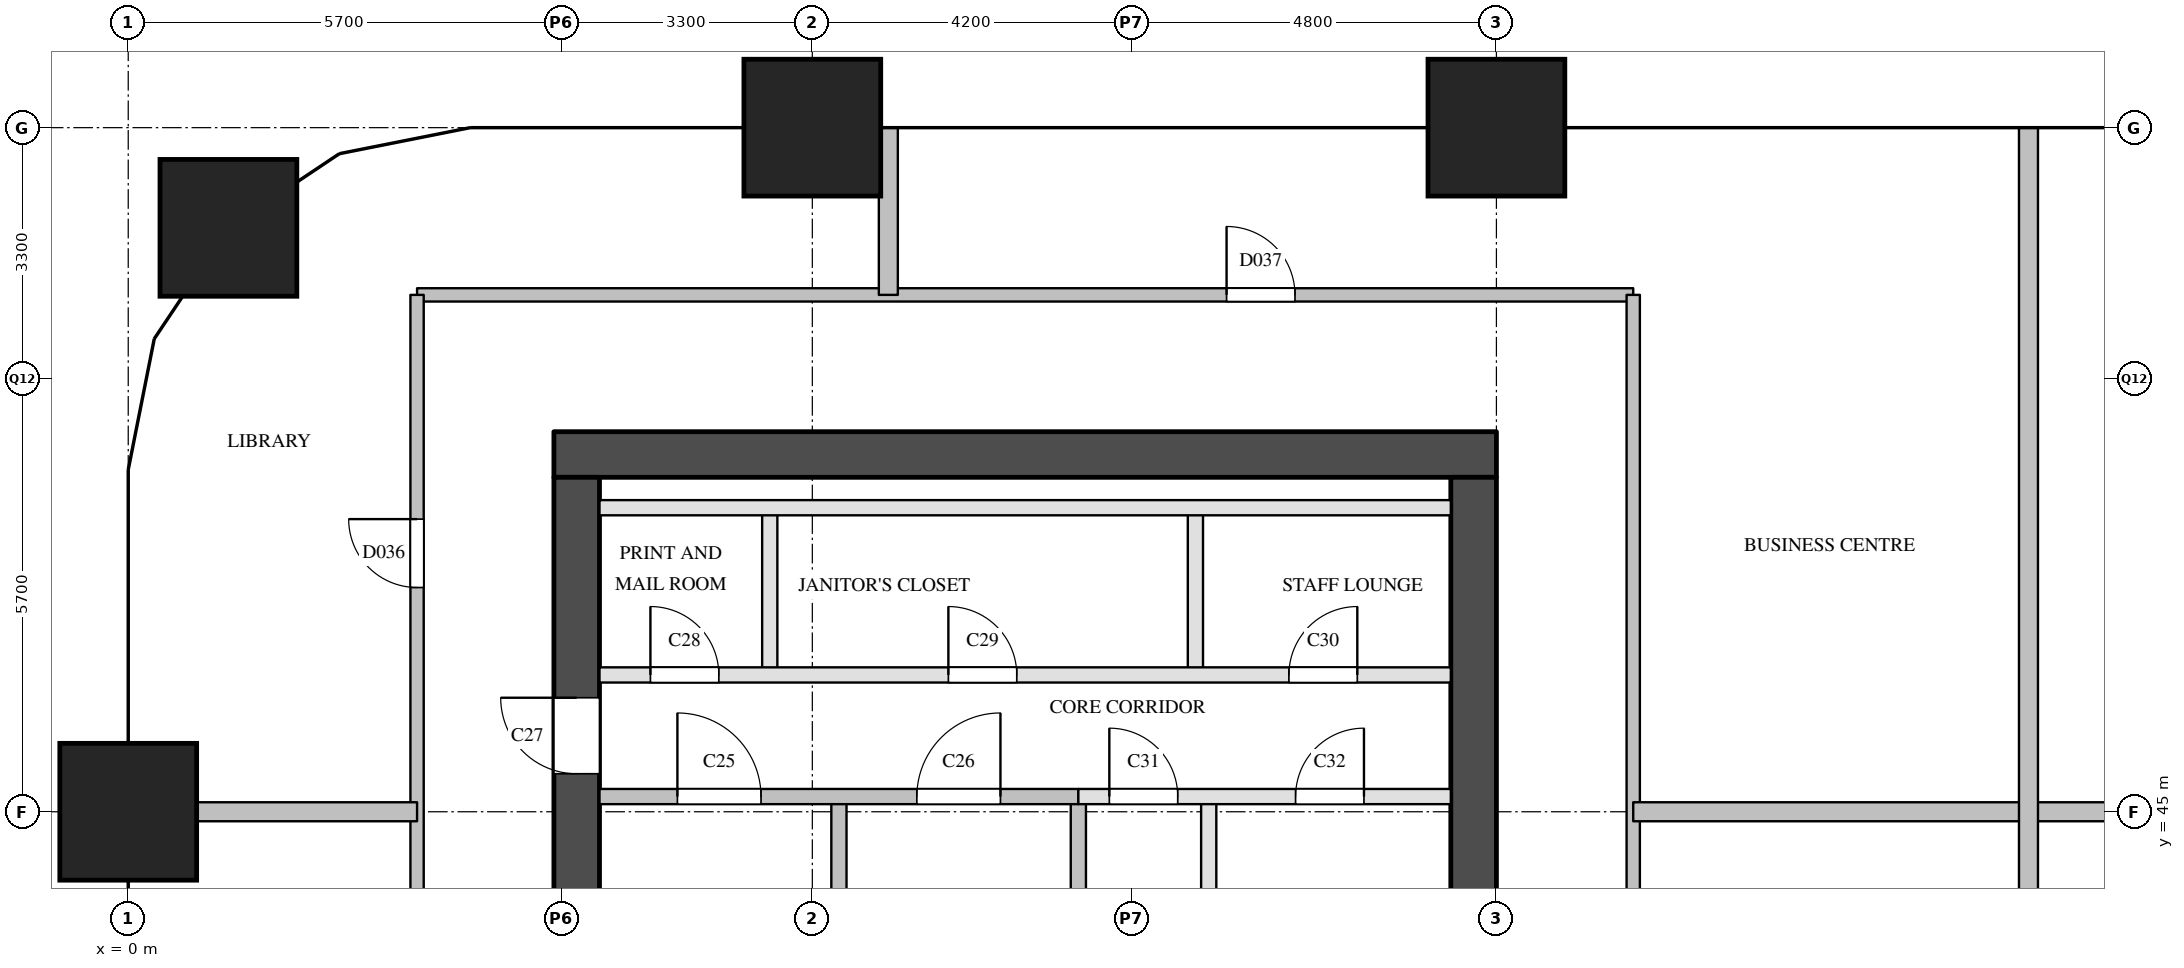
"""IFC4 building model, lengths in metres.
Left out: names, types, materials, properties, quantities, classifications, styles, units other than length and angle.
Written with IfcOpenShell. Run it as: python <this file> out.ifc"""

import sys

from ifc_helpers import new_model, si_unit, direction, frame, frame_2d, origin, origin_2d, place, context, subcontext, project, spatial, rectangle, extrude, element, fill, save


model = new_model("IFC4")
c1 = context("Model", 3, precision=1e-05, world=origin(), true_north=direction((0.0, 1.0)))
c2 = subcontext(c1, "Body", "Model", "MODEL_VIEW")
j1 = project(units=[si_unit("LENGTHUNIT", "METRE"), si_unit("PLANEANGLEUNIT", "RADIAN")], contexts=[c1])
p1 = place(None, origin())
s1 = spatial("IfcSite", under=j1, at=p1, CompositionType="ELEMENT")
p2 = place(p1, origin())
s2 = spatial("IfcBuilding", under=s1, at=p2, CompositionType="ELEMENT")
p3 = place(p2, frame((0.0, 0.0, 42.4)))
s3 = spatial("IfcBuildingStorey", under=s2, at=p3, CompositionType="ELEMENT", Elevation=42.4)
for number, where, z_axis, x_axis in (
    (1, (0.0, 45.0, 0.0), (0.0, 0.0, 1.0), (1.0, 0.0, 0.0)),
    (2, (1.318, 52.682, 0.0), (0.0, 0.0, 1.0), (1.0, 0.0, 0.0)),
    (3, (9.0, 54.0, 0.0), (0.0, 0.0, 1.0), (1.0, 0.0, 0.0)),
    (4, (18.0, 54.0, 0.0), (0.0, 0.0, 1.0), (1.0, 0.0, 0.0)),
):
    element("IfcColumn", number, at=place(p3, frame(where, z_axis=z_axis, x_axis=x_axis)), inside=s3, PredefinedType="COLUMN", context=c2, shape_type="SweptSolid", body=[
        extrude(rectangle(XDim=1.8, YDim=1.8, at=origin_2d()), origin(), (0.0, 0.0, 1.0), 3.8),
    ])
p4 = place(p3, frame((5.6, 49.7, 0.0), z_axis=(0.0, 0.0, 1.0), x_axis=(1.0, 0.0, 0.0)))
e5 = element("IfcWall", 5, at=p4, inside=s3, PredefinedType="SHEAR", context=c2, shape_type="SweptSolid", body=[
    extrude(rectangle(XDim=12.4, YDim=0.6, at=frame_2d((6.2, 0.0))), origin(), (0.0, 0.0, 1.0), 3.5),
])
p5 = place(p3, frame((5.9, 29.1, 0.0), z_axis=(0.0, 0.0, 1.0), x_axis=(0.0, 1.0, 0.0)))
e6 = element("IfcWall", 6, at=p5, inside=s3, PredefinedType="SHEAR", context=c2, shape_type="SweptSolid", body=[
    extrude(rectangle(XDim=20.3, YDim=0.6, at=frame_2d((10.15, 0.0))), origin(), (0.0, 0.0, 1.0), 3.5),
])
p6 = place(p5, frame((3.6, 0.0, 0.0)))
e7 = element("IfcOpeningElement", 7, at=p6, cuts=e6, PredefinedType="OPENING", context=c2, shape_type="SweptSolid", body=[
    extrude(rectangle(XDim=1.8, YDim=2.1, at=frame_2d((0.9, 1.05))), frame((0.0, 0.31, 0.0), z_axis=(0.0, -1.0, 0.0), x_axis=(1.0, 0.0, 0.0)), (0.0, 0.0, 1.0), 0.62),
])
p7 = place(p5, frame((16.4, 0.0, 0.0)))
e8 = element("IfcOpeningElement", 8, at=p7, cuts=e6, PredefinedType="OPENING", context=c2, shape_type="SweptSolid", body=[
    extrude(rectangle(XDim=1.0, YDim=2.1, at=frame_2d((0.5, 1.05))), frame((0.0, 0.31, 0.0), z_axis=(0.0, -1.0, 0.0), x_axis=(1.0, 0.0, 0.0)), (0.0, 0.0, 1.0), 0.62),
])
p8 = place(p3, frame((17.7, 29.1, 0.0), z_axis=(0.0, 0.0, 1.0), x_axis=(0.0, 1.0, 0.0)))
e9 = element("IfcWall", 9, at=p8, inside=s3, PredefinedType="SHEAR", context=c2, shape_type="SweptSolid", body=[
    extrude(rectangle(XDim=20.3, YDim=0.6, at=frame_2d((10.15, 0.0))), origin(), (0.0, 0.0, 1.0), 3.5),
])
p9 = place(p8, frame((1.25, 0.0, 0.0)))
e10 = element("IfcOpeningElement", 10, at=p9, cuts=e9, PredefinedType="OPENING", context=c2, shape_type="SweptSolid", body=[
    extrude(rectangle(XDim=0.7, YDim=2.1, at=frame_2d((0.35, 1.05))), frame((0.0, 0.31, 0.0), z_axis=(0.0, -1.0, 0.0), x_axis=(1.0, 0.0, 0.0)), (0.0, 0.0, 1.0), 0.62),
])
p10 = place(p8, frame((7.05, 0.0, 0.0)))
e11 = element("IfcOpeningElement", 11, at=p10, cuts=e9, PredefinedType="OPENING", context=c2, shape_type="SweptSolid", body=[
    extrude(rectangle(XDim=0.7, YDim=2.1, at=frame_2d((0.35, 1.05))), frame((0.0, 0.31, 0.0), z_axis=(0.0, -1.0, 0.0), x_axis=(1.0, 0.0, 0.0)), (0.0, 0.0, 1.0), 0.62),
])
p11 = place(p3, frame((8.44, 46.8, 0.0), z_axis=(0.0, 0.0, 1.0), x_axis=(0.0, 1.0, 0.0)))
e12 = element("IfcWall", 12, at=p11, inside=s3, PredefinedType="PARTITIONING", context=c2, shape_type="SweptSolid", body=[
    extrude(rectangle(XDim=2.2, YDim=0.2, at=frame_2d((1.1, 0.0))), origin(), (0.0, 0.0, 1.0), 3.5),
])
for number, where, z_axis, x_axis in (
    (13, (9.35, 40.9, 0.0), (0.0, 0.0, 1.0), (0.0, 1.0, 0.0)),
    (14, (12.5, 40.9, 0.0), (0.0, 0.0, 1.0), (0.0, 1.0, 0.0)),
):
    element("IfcWall", number, at=place(p3, frame(where, z_axis=z_axis, x_axis=x_axis)), inside=s3, PredefinedType="SOLIDWALL", context=c2, shape_type="SweptSolid", body=[
        extrude(rectangle(XDim=4.3, YDim=0.2, at=frame_2d((2.15, 0.0))), origin(), (0.0, 0.0, 1.0), 3.5),
    ])
p12 = place(p3, frame((14.04, 46.8, 0.0), z_axis=(0.0, 0.0, 1.0), x_axis=(0.0, 1.0, 0.0)))
e15 = element("IfcWall", 15, at=p12, inside=s3, PredefinedType="PARTITIONING", context=c2, shape_type="SweptSolid", body=[
    extrude(rectangle(XDim=2.2, YDim=0.2, at=frame_2d((1.1, 0.0))), origin(), (0.0, 0.0, 1.0), 3.5),
])
p13 = place(p3, frame((14.215, 39.0, 0.0), z_axis=(0.0, 0.0, 1.0), x_axis=(0.0, 1.0, 0.0)))
e16 = element("IfcWall", 16, at=p13, inside=s3, PredefinedType="PARTITIONING", context=c2, shape_type="SweptSolid", body=[
    extrude(rectangle(XDim=6.2, YDim=0.2, at=frame_2d((3.1, 0.0))), origin(), (0.0, 0.0, 1.0), 3.5),
])
p14 = place(p3, frame((12.5, 45.2, 0.0), z_axis=(0.0, 0.0, 1.0), x_axis=(1.0, 0.0, 0.0)))
e17 = element("IfcWall", 17, at=p14, inside=s3, PredefinedType="PARTITIONING", context=c2, shape_type="SweptSolid", body=[
    extrude(rectangle(XDim=4.9, YDim=0.2, at=frame_2d((2.45, 0.0))), origin(), (0.0, 0.0, 1.0), 3.5),
])
p15 = place(p14, frame((0.407, 0.0, 0.0)))
e18 = element("IfcOpeningElement", 18, at=p15, cuts=e17, PredefinedType="OPENING", context=c2, shape_type="SweptSolid", body=[
    extrude(rectangle(XDim=0.9, YDim=2.1, at=frame_2d((0.45, 1.05))), frame((0.0, 0.11, 0.0), z_axis=(0.0, -1.0, 0.0), x_axis=(1.0, 0.0, 0.0)), (0.0, 0.0, 1.0), 0.22),
])
p16 = place(p14, frame((2.857, 0.0, 0.0)))
e19 = element("IfcOpeningElement", 19, at=p16, cuts=e17, PredefinedType="OPENING", context=c2, shape_type="SweptSolid", body=[
    extrude(rectangle(XDim=0.9, YDim=2.1, at=frame_2d((0.45, 1.05))), frame((0.0, 0.11, 0.0), z_axis=(0.0, -1.0, 0.0), x_axis=(1.0, 0.0, 0.0)), (0.0, 0.0, 1.0), 0.22),
])
p17 = place(p3, frame((6.2, 45.2, 0.0), z_axis=(0.0, 0.0, 1.0), x_axis=(1.0, 0.0, 0.0)))
e20 = element("IfcWall", 20, at=p17, inside=s3, PredefinedType="SOLIDWALL", context=c2, shape_type="SweptSolid", body=[
    extrude(rectangle(XDim=6.3, YDim=0.2, at=frame_2d((3.15, 0.0))), origin(), (0.0, 0.0, 1.0), 3.5),
])
p18 = place(p17, frame((1.025, 0.0, 0.0)))
e21 = element("IfcOpeningElement", 21, at=p18, cuts=e20, PredefinedType="OPENING", context=c2, shape_type="SweptSolid", body=[
    extrude(rectangle(XDim=1.1, YDim=2.1, at=frame_2d((0.55, 1.05))), frame((0.0, 0.11, 0.0), z_axis=(0.0, -1.0, 0.0), x_axis=(1.0, 0.0, 0.0)), (0.0, 0.0, 1.0), 0.22),
])
p19 = place(p17, frame((4.175, 0.0, 0.0)))
e22 = element("IfcOpeningElement", 22, at=p19, cuts=e20, PredefinedType="OPENING", context=c2, shape_type="SweptSolid", body=[
    extrude(rectangle(XDim=1.1, YDim=2.1, at=frame_2d((0.55, 1.05))), frame((0.0, 0.11, 0.0), z_axis=(0.0, -1.0, 0.0), x_axis=(1.0, 0.0, 0.0)), (0.0, 0.0, 1.0), 0.22),
])
p20 = place(p3, frame((6.2, 46.8, 0.0), z_axis=(0.0, 0.0, 1.0), x_axis=(1.0, 0.0, 0.0)))
e23 = element("IfcWall", 23, at=p20, inside=s3, PredefinedType="PARTITIONING", context=c2, shape_type="SweptSolid", body=[
    extrude(rectangle(XDim=11.2, YDim=0.2, at=frame_2d((5.6, 0.0))), origin(), (0.0, 0.0, 1.0), 3.5),
])
p21 = place(p20, frame((0.67, 0.0, 0.0)))
e24 = element("IfcOpeningElement", 24, at=p21, cuts=e23, PredefinedType="OPENING", context=c2, shape_type="SweptSolid", body=[
    extrude(rectangle(XDim=0.9, YDim=2.1, at=frame_2d((0.45, 1.05))), frame((0.0, 0.11, 0.0), z_axis=(0.0, -1.0, 0.0), x_axis=(1.0, 0.0, 0.0)), (0.0, 0.0, 1.0), 0.22),
])
p22 = place(p20, frame((4.59, 0.0, 0.0)))
e25 = element("IfcOpeningElement", 25, at=p22, cuts=e23, PredefinedType="OPENING", context=c2, shape_type="SweptSolid", body=[
    extrude(rectangle(XDim=0.9, YDim=2.1, at=frame_2d((0.45, 1.05))), frame((0.0, 0.11, 0.0), z_axis=(0.0, -1.0, 0.0), x_axis=(1.0, 0.0, 0.0)), (0.0, 0.0, 1.0), 0.22),
])
p23 = place(p20, frame((9.07, 0.0, 0.0)))
e26 = element("IfcOpeningElement", 26, at=p23, cuts=e23, PredefinedType="OPENING", context=c2, shape_type="SweptSolid", body=[
    extrude(rectangle(XDim=0.9, YDim=2.1, at=frame_2d((0.45, 1.05))), frame((0.0, 0.11, 0.0), z_axis=(0.0, -1.0, 0.0), x_axis=(1.0, 0.0, 0.0)), (0.0, 0.0, 1.0), 0.22),
])
p24 = place(p3, frame((6.2, 49.0, 0.0), z_axis=(0.0, 0.0, 1.0), x_axis=(1.0, 0.0, 0.0)))
e27 = element("IfcWall", 27, at=p24, inside=s3, PredefinedType="PARTITIONING", context=c2, shape_type="SweptSolid", body=[
    extrude(rectangle(XDim=11.2, YDim=0.2, at=frame_2d((5.6, 0.0))), origin(), (0.0, 0.0, 1.0), 3.5),
])
p25 = place(p3, frame((3.8, 51.8, 0.0), z_axis=(0.0, 0.0, 1.0), x_axis=(1.0, 0.0, 0.0)))
e28 = element("IfcWall", 28, at=p25, inside=s3, PredefinedType="PARTITIONING", context=c2, shape_type="SweptSolid", body=[
    extrude(rectangle(XDim=16.0, YDim=0.175, at=frame_2d((8.0, 0.0))), origin(), (0.0, 0.0, 1.0), 3.5),
])
p26 = place(p25, frame((10.65, 0.0, 0.0)))
e29 = element("IfcOpeningElement", 29, at=p26, cuts=e28, PredefinedType="OPENING", context=c2, shape_type="SweptSolid", body=[
    extrude(rectangle(XDim=0.9, YDim=2.1, at=frame_2d((0.45, 1.05))), frame((0.0, 0.097, 0.0), z_axis=(0.0, -1.0, 0.0), x_axis=(1.0, 0.0, 0.0)), (0.0, 0.0, 1.0), 0.195),
])
p27 = place(p3, frame((3.8, 26.7, 0.0), z_axis=(0.0, 0.0, 1.0), x_axis=(0.0, 1.0, 0.0)))
e30 = element("IfcWall", 30, at=p27, inside=s3, PredefinedType="PARTITIONING", context=c2, shape_type="SweptSolid", body=[
    extrude(rectangle(XDim=25.1, YDim=0.175, at=frame_2d((12.55, 0.0))), origin(), (0.0, 0.0, 1.0), 2.5),
])
p28 = place(p27, frame((3.7, 0.0, 0.0)))
e31 = element("IfcOpeningElement", 31, at=p28, cuts=e30, PredefinedType="OPENING", context=c2, shape_type="SweptSolid", body=[
    extrude(rectangle(XDim=0.9, YDim=2.1, at=frame_2d((0.45, 1.05))), frame((0.0, 0.097, 0.0), z_axis=(0.0, -1.0, 0.0), x_axis=(1.0, 0.0, 0.0)), (0.0, 0.0, 1.0), 0.195),
])
p29 = place(p27, frame((10.35, 0.0, 0.0)))
e32 = element("IfcOpeningElement", 32, at=p29, cuts=e30, PredefinedType="OPENING", context=c2, shape_type="SweptSolid", body=[
    extrude(rectangle(XDim=0.9, YDim=2.1, at=frame_2d((0.45, 1.05))), frame((0.0, 0.097, 0.0), z_axis=(0.0, -1.0, 0.0), x_axis=(1.0, 0.0, 0.0)), (0.0, 0.0, 1.0), 0.195),
])
p30 = place(p27, frame((15.35, 0.0, 0.0)))
e33 = element("IfcOpeningElement", 33, at=p30, cuts=e30, PredefinedType="OPENING", context=c2, shape_type="SweptSolid", body=[
    extrude(rectangle(XDim=0.9, YDim=2.1, at=frame_2d((0.45, 1.05))), frame((0.0, 0.097, 0.0), z_axis=(0.0, -1.0, 0.0), x_axis=(1.0, 0.0, 0.0)), (0.0, 0.0, 1.0), 0.195),
])
p31 = place(p27, frame((21.25, 0.0, 0.0)))
e34 = element("IfcOpeningElement", 34, at=p31, cuts=e30, PredefinedType="OPENING", context=c2, shape_type="SweptSolid", body=[
    extrude(rectangle(XDim=0.9, YDim=2.1, at=frame_2d((0.45, 1.05))), frame((0.0, 0.097, 0.0), z_axis=(0.0, -1.0, 0.0), x_axis=(1.0, 0.0, 0.0)), (0.0, 0.0, 1.0), 0.195),
])
p32 = place(p3, frame((19.8, 29.12, 0.0), z_axis=(0.0, 0.0, 1.0), x_axis=(0.0, 1.0, 0.0)))
e35 = element("IfcWall", 35, at=p32, inside=s3, PredefinedType="PARTITIONING", context=c2, shape_type="SweptSolid", body=[
    extrude(rectangle(XDim=22.68, YDim=0.175, at=frame_2d((11.34, 0.0))), origin(), (0.0, 0.0, 1.0), 3.5),
])
p33 = place(p32, frame((2.44, 0.0, 0.0)))
e36 = element("IfcOpeningElement", 36, at=p33, cuts=e35, PredefinedType="OPENING", context=c2, shape_type="SweptSolid", body=[
    extrude(rectangle(XDim=1.0, YDim=2.1, at=frame_2d((0.5, 1.05))), frame((0.0, 0.097, 0.0), z_axis=(0.0, -1.0, 0.0), x_axis=(1.0, 0.0, 0.0)), (0.0, 0.0, 1.0), 0.195),
])
p34 = place(p32, frame((10.43, 0.0, 0.0)))
e37 = element("IfcOpeningElement", 37, at=p34, cuts=e35, PredefinedType="OPENING", context=c2, shape_type="SweptSolid", body=[
    extrude(rectangle(XDim=0.9, YDim=2.1, at=frame_2d((0.45, 1.05))), frame((0.0, 0.097, 0.0), z_axis=(0.0, -1.0, 0.0), x_axis=(1.0, 0.0, 0.0)), (0.0, 0.0, 1.0), 0.195),
])
p35 = place(p3, frame((0.0, 45.0, 0.0), z_axis=(0.0, 0.0, 1.0), x_axis=(1.0, 0.0, 0.0)))
e38 = element("IfcWall", 38, at=p35, inside=s3, PredefinedType="PARTITIONING", context=c2, shape_type="SweptSolid", body=[
    extrude(rectangle(XDim=3.8, YDim=0.25, at=frame_2d((1.9, 0.0))), origin(), (0.0, 0.0, 1.0), 3.5),
])
p36 = place(p3, frame((19.8, 45.0, 0.0), z_axis=(0.0, 0.0, 1.0), x_axis=(1.0, 0.0, 0.0)))
e39 = element("IfcWall", 39, at=p36, inside=s3, PredefinedType="PARTITIONING", context=c2, shape_type="SweptSolid", body=[
    extrude(rectangle(XDim=14.4, YDim=0.25, at=frame_2d((7.2, 0.0))), origin(), (0.0, 0.0, 1.0), 3.5),
])
p37 = place(p3, frame((10.0, 51.8, 0.0), z_axis=(0.0, 0.0, 1.0), x_axis=(0.0, 1.0, 0.0)))
e40 = element("IfcWall", 40, at=p37, inside=s3, PredefinedType="PARTITIONING", context=c2, shape_type="SweptSolid", body=[
    extrude(rectangle(XDim=2.2, YDim=0.25, at=frame_2d((1.1, 0.0))), origin(), (0.0, 0.0, 1.0), 2.5),
])
p38 = place(p3, frame((25.0, 25.0, 0.0), z_axis=(0.0, 0.0, 1.0), x_axis=(0.0, 1.0, 0.0)))
e41 = element("IfcWall", 41, at=p38, inside=s3, PredefinedType="PARTITIONING", context=c2, shape_type="SweptSolid", body=[
    extrude(rectangle(XDim=29.0, YDim=0.25, at=frame_2d((14.5, 0.0))), origin(), (0.0, 0.0, 1.0), 2.5),
])
p39 = place(p18, origin())
e42 = element("IfcDoor", 42, at=p39, inside=s3, OperationType="SINGLE_SWING_LEFT", PredefinedType="DOOR", context=c2, shape_type="SweptSolid", body=[
    extrude(rectangle(XDim=1.1, YDim=2.1, at=frame_2d((0.55, 1.05))), frame((0.0, 0.025, 0.0), z_axis=(0.0, -1.0, 0.0), x_axis=(1.0, 0.0, 0.0)), (0.0, 0.0, 1.0), 0.05),
])
fill(e21, e42)
p40 = place(p19, origin())
e43 = element("IfcDoor", 43, at=p40, inside=s3, OperationType="SINGLE_SWING_RIGHT", PredefinedType="DOOR", context=c2, shape_type="SweptSolid", body=[
    extrude(rectangle(XDim=1.1, YDim=2.1, at=frame_2d((0.55, 1.05))), frame((0.0, 0.025, 0.0), z_axis=(0.0, -1.0, 0.0), x_axis=(1.0, 0.0, 0.0)), (0.0, 0.0, 1.0), 0.05),
])
fill(e22, e43)
p41 = place(p7, origin())
e44 = element("IfcDoor", 44, at=p41, inside=s3, OperationType="SINGLE_SWING_RIGHT", PredefinedType="DOOR", context=c2, shape_type="SweptSolid", body=[
    extrude(rectangle(XDim=1.0, YDim=2.1, at=frame_2d((0.5, 1.05))), frame((0.0, 0.025, 0.0), z_axis=(0.0, -1.0, 0.0), x_axis=(1.0, 0.0, 0.0)), (0.0, 0.0, 1.0), 0.05),
])
fill(e8, e44)
p42 = place(p21, origin())
e45 = element("IfcDoor", 45, at=p42, inside=s3, OperationType="SINGLE_SWING_LEFT", PredefinedType="DOOR", context=c2, shape_type="SweptSolid", body=[
    extrude(rectangle(XDim=0.9, YDim=2.1, at=frame_2d((0.45, 1.05))), frame((0.0, 0.025, 0.0), z_axis=(0.0, -1.0, 0.0), x_axis=(1.0, 0.0, 0.0)), (0.0, 0.0, 1.0), 0.05),
])
fill(e24, e45)
p43 = place(p22, origin())
e46 = element("IfcDoor", 46, at=p43, inside=s3, OperationType="SINGLE_SWING_LEFT", PredefinedType="DOOR", context=c2, shape_type="SweptSolid", body=[
    extrude(rectangle(XDim=0.9, YDim=2.1, at=frame_2d((0.45, 1.05))), frame((0.0, 0.025, 0.0), z_axis=(0.0, -1.0, 0.0), x_axis=(1.0, 0.0, 0.0)), (0.0, 0.0, 1.0), 0.05),
])
fill(e25, e46)
p44 = place(p23, origin())
e47 = element("IfcDoor", 47, at=p44, inside=s3, OperationType="SINGLE_SWING_RIGHT", PredefinedType="DOOR", context=c2, shape_type="SweptSolid", body=[
    extrude(rectangle(XDim=0.9, YDim=2.1, at=frame_2d((0.45, 1.05))), frame((0.0, 0.025, 0.0), z_axis=(0.0, -1.0, 0.0), x_axis=(1.0, 0.0, 0.0)), (0.0, 0.0, 1.0), 0.05),
])
fill(e26, e47)
p45 = place(p15, origin())
e48 = element("IfcDoor", 48, at=p45, inside=s3, OperationType="SINGLE_SWING_LEFT", PredefinedType="DOOR", context=c2, shape_type="SweptSolid", body=[
    extrude(rectangle(XDim=0.9, YDim=2.1, at=frame_2d((0.45, 1.05))), frame((0.0, 0.025, 0.0), z_axis=(0.0, -1.0, 0.0), x_axis=(1.0, 0.0, 0.0)), (0.0, 0.0, 1.0), 0.05),
])
fill(e18, e48)
p46 = place(p16, origin())
e49 = element("IfcDoor", 49, at=p46, inside=s3, OperationType="SINGLE_SWING_RIGHT", PredefinedType="DOOR", context=c2, shape_type="SweptSolid", body=[
    extrude(rectangle(XDim=0.9, YDim=2.1, at=frame_2d((0.45, 1.05))), frame((0.0, 0.025, 0.0), z_axis=(0.0, -1.0, 0.0), x_axis=(1.0, 0.0, 0.0)), (0.0, 0.0, 1.0), 0.05),
])
fill(e19, e49)
p47 = place(p31, origin())
e50 = element("IfcDoor", 50, at=p47, inside=s3, OperationType="SINGLE_SWING_RIGHT", PredefinedType="DOOR", context=c2, shape_type="SweptSolid", body=[
    extrude(rectangle(XDim=0.9, YDim=2.1, at=frame_2d((0.45, 1.05))), frame((0.0, 0.025, 0.0), z_axis=(0.0, -1.0, 0.0), x_axis=(1.0, 0.0, 0.0)), (0.0, 0.0, 1.0), 0.05),
])
fill(e34, e50)
p48 = place(p26, origin())
e51 = element("IfcDoor", 51, at=p48, inside=s3, OperationType="SINGLE_SWING_LEFT", PredefinedType="DOOR", context=c2, shape_type="SweptSolid", body=[
    extrude(rectangle(XDim=0.9, YDim=2.1, at=frame_2d((0.45, 1.05))), frame((0.0, 0.025, 0.0), z_axis=(0.0, -1.0, 0.0), x_axis=(1.0, 0.0, 0.0)), (0.0, 0.0, 1.0), 0.05),
])
fill(e29, e51)
save(model, sys.argv[1])
